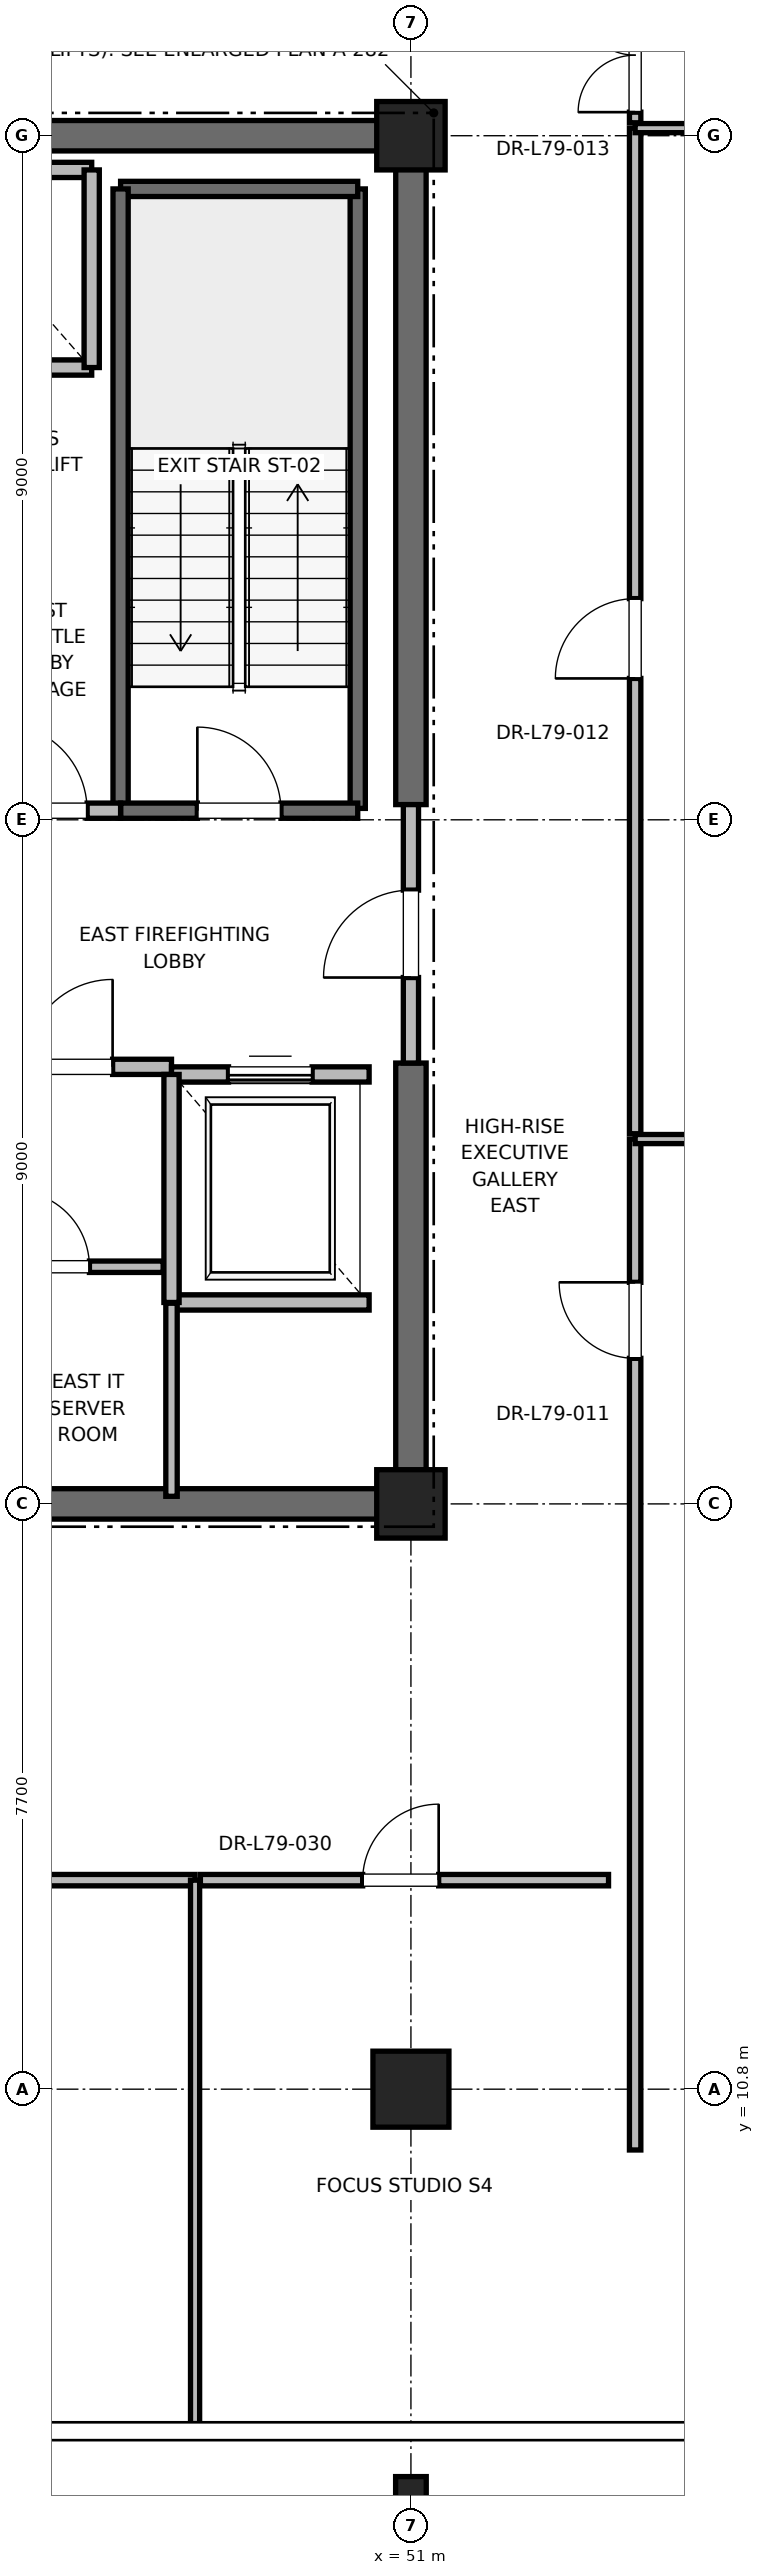
"""IFC4 building model, lengths in metres.
Left out: names, types, materials, properties, quantities, classifications, styles, units other than length and angle.
Written with IfcOpenShell. Run it as: python <this file> out.ifc"""

import sys

from ifc_helpers import new_model, si_unit, direction, frame, frame_2d, origin, origin_2d, place, context, subcontext, project, spatial, rectangle, i_section, extrude, element, fill, save


model = new_model("IFC4")
c1 = context("Model", 3, precision=1e-05, world=origin(), true_north=direction((0.0, 1.0)))
c2 = subcontext(c1, "Body", "Model", "MODEL_VIEW")
j1 = project(units=[si_unit("LENGTHUNIT", "METRE"), si_unit("PLANEANGLEUNIT", "RADIAN")], contexts=[c1])
p1 = place(None, origin())
s1 = spatial("IfcSite", under=j1, at=p1, CompositionType="ELEMENT")
p2 = place(p1, origin())
s2 = spatial("IfcBuilding", under=s1, at=p2, CompositionType="ELEMENT")
p3 = place(p2, frame((0.0, 0.0, 338.8)))
s3 = spatial("IfcBuildingStorey", under=s2, at=p3, CompositionType="ELEMENT", Elevation=338.8)
p4 = place(p3, frame((51.0, 10.8, 0.0), z_axis=(0.0, 0.0, 1.0), x_axis=(1.0, 0.0, 0.0)))
e1 = element("IfcColumn", 1, at=p4, inside=s3, PredefinedType="COLUMN", context=c2, shape_type="SweptSolid", body=[
    extrude(rectangle(XDim=1.0, YDim=1.0, at=origin_2d()), origin(), (0.0, 0.0, 1.0), 4.0),
])
p5 = place(p3, frame((51.0, 5.5, 0.0), z_axis=(0.0, 0.0, 1.0), x_axis=(1.0, 0.0, 0.0)))
e2 = element("IfcColumn", 2, at=p5, inside=s3, PredefinedType="COLUMN", context=c2, shape_type="SweptSolid", body=[
    extrude(i_section(OverallWidth=0.403, OverallDepth=0.406, WebThickness=0.027, FlangeThickness=0.043, FilletRadius=0.015, at=origin_2d()), origin(), (0.0, 0.0, 1.0), 4.0),
])
for number, where, z_axis, x_axis in (
    (3, (51.0, 18.5, 0.0), (0.0, 0.0, 1.0), (1.0, 0.0, 0.0)),
    (4, (51.0, 36.5, 0.0), (0.0, 0.0, 1.0), (1.0, 0.0, 0.0)),
):
    element("IfcColumn", number, at=place(p3, frame(where, z_axis=z_axis, x_axis=x_axis)), inside=s3, PredefinedType="PILASTER", context=c2, shape_type="SweptSolid", body=[
        extrude(rectangle(XDim=0.9, YDim=0.9, at=origin_2d()), origin(), (0.0, 0.0, 1.0), 4.0),
    ])
p6 = place(p3, frame((41.8, 18.5, 0.0), z_axis=(0.0, 0.0, 1.0), x_axis=(1.0, 0.0, 0.0)))
e5 = element("IfcWall", 5, at=p6, inside=s3, PredefinedType="SHEAR", context=c2, shape_type="SweptSolid", body=[
    extrude(rectangle(XDim=9.2, YDim=0.4, at=frame_2d((4.6, 0.0))), origin(), (0.0, 0.0, 1.0), 3.7),
])
for number, where, z_axis, x_axis in (
    (6, (45.2, 36.5, 0.0), (0.0, 0.0, 1.0), (1.0, 0.0, 0.0)),
    (7, (51.0, 18.5, 0.0), (0.0, 0.0, 1.0), (0.0, 1.0, 0.0)),
):
    element("IfcWall", number, at=place(p3, frame(where, z_axis=z_axis, x_axis=x_axis)), inside=s3, PredefinedType="SHEAR", context=c2, shape_type="SweptSolid", body=[
        extrude(rectangle(XDim=5.8, YDim=0.4, at=frame_2d((2.9, 0.0))), origin(), (0.0, 0.0, 1.0), 3.7),
    ])
p7 = place(p3, frame((51.0, 27.7, 0.0), z_axis=(0.0, 0.0, 1.0), x_axis=(0.0, 1.0, 0.0)))
e8 = element("IfcWall", 8, at=p7, inside=s3, PredefinedType="SHEAR", context=c2, shape_type="SweptSolid", body=[
    extrude(rectangle(XDim=8.8, YDim=0.4, at=frame_2d((4.4, 0.0))), origin(), (0.0, 0.0, 1.0), 3.7),
])
p8 = place(p3, frame((50.3, 27.65, 0.0), z_axis=(0.0, 0.0, 1.0), x_axis=(0.0, 1.0, 0.0)))
e9 = element("IfcWall", 9, at=p8, inside=s3, PredefinedType="SOLIDWALL", context=c2, shape_type="SweptSolid", body=[
    extrude(rectangle(XDim=8.15, YDim=0.2, at=frame_2d((4.075, 0.0))), origin(), (0.0, 0.0, 1.0), 3.7),
])
p9 = place(p3, frame((47.18, 35.8, 0.0), z_axis=(0.0, 0.0, 1.0), x_axis=(1.0, 0.0, 0.0)))
e10 = element("IfcWall", 10, at=p9, inside=s3, PredefinedType="SOLIDWALL", context=c2, shape_type="SweptSolid", body=[
    extrude(rectangle(XDim=3.12, YDim=0.2, at=frame_2d((1.56, 0.0))), origin(), (0.0, 0.0, 1.0), 3.7),
])
p10 = place(p3, frame((47.18, 27.62, 0.0), z_axis=(0.0, 0.0, 1.0), x_axis=(0.0, 1.0, 0.0)))
e11 = element("IfcWall", 11, at=p10, inside=s3, PredefinedType="SOLIDWALL", context=c2, shape_type="SweptSolid", body=[
    extrude(rectangle(XDim=8.18, YDim=0.2, at=frame_2d((4.09, 0.0))), origin(), (0.0, 0.0, 1.0), 3.7),
])
p11 = place(p3, frame((47.18, 27.62, 0.0), z_axis=(0.0, 0.0, 1.0), x_axis=(1.0, 0.0, 0.0)))
e12 = element("IfcWall", 12, at=p11, inside=s3, PredefinedType="SOLIDWALL", context=c2, shape_type="SweptSolid", body=[
    extrude(rectangle(XDim=3.12, YDim=0.2, at=frame_2d((1.56, 0.0))), origin(), (0.0, 0.0, 1.0), 3.7),
])
p12 = place(p11, frame((1.01, 0.0, 0.0)))
e13 = element("IfcOpeningElement", 13, at=p12, cuts=e12, PredefinedType="OPENING", context=c2, shape_type="SweptSolid", body=[
    extrude(rectangle(XDim=1.1, YDim=2.15, at=frame_2d((0.55, 1.075))), frame((0.0, 0.1, 0.0), z_axis=(0.0, -1.0, 0.0), x_axis=(1.0, 0.0, 0.0)), (0.0, 0.0, 1.0), 0.2),
])
p13 = place(p3, frame((45.15, 24.25, 0.0), z_axis=(0.0, 0.0, 1.0), x_axis=(1.0, 0.0, 0.0)))
e14 = element("IfcWall", 14, at=p13, inside=s3, PredefinedType="PARTITIONING", context=c2, shape_type="SweptSolid", body=[
    extrude(rectangle(XDim=2.7, YDim=0.2, at=frame_2d((1.35, 0.0))), origin(), (0.0, 0.0, 1.0), 3.7),
])
p14 = place(p13, frame((0.775, 0.0, 0.0)))
e15 = element("IfcOpeningElement", 15, at=p14, cuts=e14, PredefinedType="OPENING", context=c2, shape_type="SweptSolid", body=[
    extrude(rectangle(XDim=1.15, YDim=2.2, at=frame_2d((0.575, 1.1))), frame((0.0, 0.1, 0.0), z_axis=(0.0, -1.0, 0.0), x_axis=(1.0, 0.0, 0.0)), (0.0, 0.0, 1.0), 0.2),
])
p15 = place(p3, frame((45.15, 27.62, 0.0), z_axis=(0.0, 0.0, 1.0), x_axis=(1.0, 0.0, 0.0)))
e16 = element("IfcWall", 16, at=p15, inside=s3, PredefinedType="PARTITIONING", context=c2, shape_type="SweptSolid", body=[
    extrude(rectangle(XDim=2.03, YDim=0.2, at=frame_2d((1.015, 0.0))), origin(), (0.0, 0.0, 1.0), 3.7),
])
p16 = place(p15, frame((0.44, 0.0, 0.0)))
e17 = element("IfcOpeningElement", 17, at=p16, cuts=e16, PredefinedType="OPENING", context=c2, shape_type="SweptSolid", body=[
    extrude(rectangle(XDim=1.15, YDim=2.2, at=frame_2d((0.575, 1.1))), frame((0.0, 0.1, 0.0), z_axis=(0.0, -1.0, 0.0), x_axis=(1.0, 0.0, 0.0)), (0.0, 0.0, 1.0), 0.2),
])
p17 = place(p3, frame((51.0, 24.3, 0.0), z_axis=(0.0, 0.0, 1.0), x_axis=(0.0, 1.0, 0.0)))
e18 = element("IfcWall", 18, at=p17, inside=s3, PredefinedType="PARTITIONING", context=c2, shape_type="SweptSolid", body=[
    extrude(rectangle(XDim=3.4, YDim=0.2, at=frame_2d((1.7, 0.0))), origin(), (0.0, 0.0, 1.0), 2.78),
])
p18 = place(p17, frame((1.125, 0.0, 0.0)))
e19 = element("IfcOpeningElement", 19, at=p18, cuts=e18, PredefinedType="OPENING", context=c2, shape_type="SweptSolid", body=[
    extrude(rectangle(XDim=1.15, YDim=2.2, at=frame_2d((0.575, 1.1))), frame((0.0, 0.1, 0.0), z_axis=(0.0, -1.0, 0.0), x_axis=(1.0, 0.0, 0.0)), (0.0, 0.0, 1.0), 0.2),
])
p19 = place(p3, frame((47.85, 21.15, 0.0), z_axis=(0.0, 0.0, 1.0), x_axis=(1.0, 0.0, 0.0)))
e20 = element("IfcWall", 20, at=p19, inside=s3, PredefinedType="SOLIDWALL", context=c2, shape_type="SweptSolid", body=[
    extrude(rectangle(XDim=2.6, YDim=0.2, at=frame_2d((1.3, 0.0))), origin(), (0.0, 0.0, 1.0), 3.7),
])
p20 = place(p3, frame((50.45, 24.15, 0.0), z_axis=(0.0, 0.0, 1.0), x_axis=(-1.0, 0.0, 0.0)))
e21 = element("IfcWall", 21, at=p20, inside=s3, PredefinedType="SOLIDWALL", context=c2, shape_type="SweptSolid", body=[
    extrude(rectangle(XDim=2.6, YDim=0.2, at=frame_2d((1.3, 0.0))), origin(), (0.0, 0.0, 1.0), 2.78),
])
p21 = place(p20, frame((0.75, 0.0, 0.0)))
e22 = element("IfcOpeningElement", 22, at=p21, cuts=e21, PredefinedType="OPENING", context=c2, shape_type="SweptSolid", body=[
    extrude(rectangle(XDim=1.1, YDim=2.2, at=frame_2d((0.55, 1.1))), frame((0.0, 0.1, 0.0), z_axis=(0.0, -1.0, 0.0), x_axis=(1.0, 0.0, 0.0)), (0.0, 0.0, 1.0), 0.2),
])
p22 = place(p3, frame((47.85, 24.15, 0.0), z_axis=(0.0, 0.0, 1.0), x_axis=(0.0, -1.0, 0.0)))
e23 = element("IfcWall", 23, at=p22, inside=s3, PredefinedType="SOLIDWALL", context=c2, shape_type="SweptSolid", body=[
    extrude(rectangle(XDim=3.0, YDim=0.2, at=frame_2d((1.5, 0.0))), origin(), (0.0, 0.0, 1.0), 3.7),
])
p23 = place(p3, frame((44.5, 33.45, 0.0), z_axis=(0.0, 0.0, 1.0), x_axis=(1.0, 0.0, 0.0)))
e24 = element("IfcWall", 24, at=p23, inside=s3, PredefinedType="SOLIDWALL", context=c2, shape_type="SweptSolid", body=[
    extrude(rectangle(XDim=2.3, YDim=0.2, at=frame_2d((1.15, 0.0))), origin(), (0.0, 0.0, 1.0), 3.7),
])
p24 = place(p3, frame((46.8, 36.05, 0.0), z_axis=(0.0, 0.0, 1.0), x_axis=(-1.0, 0.0, 0.0)))
e25 = element("IfcWall", 25, at=p24, inside=s3, PredefinedType="SOLIDWALL", context=c2, shape_type="SweptSolid", body=[
    extrude(rectangle(XDim=2.3, YDim=0.2, at=frame_2d((1.15, 0.0))), origin(), (0.0, 0.0, 1.0), 2.78),
])
p25 = place(p3, frame((46.8, 33.45, 0.0), z_axis=(0.0, 0.0, 1.0), x_axis=(0.0, 1.0, 0.0)))
e26 = element("IfcWall", 26, at=p25, inside=s3, PredefinedType="SOLIDWALL", context=c2, shape_type="SweptSolid", body=[
    extrude(rectangle(XDim=2.6, YDim=0.2, at=frame_2d((1.3, 0.0))), origin(), (0.0, 0.0, 1.0), 3.7),
])
p26 = place(p3, frame((47.85, 18.6, 0.0), z_axis=(0.0, 0.0, 1.0), x_axis=(0.0, 1.0, 0.0)))
e27 = element("IfcWall", 27, at=p26, inside=s3, PredefinedType="PARTITIONING", context=c2, shape_type="SweptSolid", body=[
    extrude(rectangle(XDim=2.54, YDim=0.15, at=frame_2d((1.27, 0.0))), origin(), (0.0, 0.0, 1.0), 2.85),
])
p27 = place(p3, frame((44.8, 21.62, 0.0), z_axis=(0.0, 0.0, 1.0), x_axis=(1.0, 0.0, 0.0)))
e28 = element("IfcWall", 28, at=p27, inside=s3, PredefinedType="PARTITIONING", context=c2, shape_type="SweptSolid", body=[
    extrude(rectangle(XDim=2.94, YDim=0.15, at=frame_2d((1.47, 0.0))), origin(), (0.0, 0.0, 1.0), 2.85),
])
p28 = place(p27, frame((0.97, 0.0, 0.0)))
e29 = element("IfcOpeningElement", 29, at=p28, cuts=e28, PredefinedType="OPENING", context=c2, shape_type="SweptSolid", body=[
    extrude(rectangle(XDim=1.0, YDim=2.15, at=frame_2d((0.5, 1.075))), frame((0.0, 0.075, 0.0), z_axis=(0.0, -1.0, 0.0), x_axis=(1.0, 0.0, 0.0)), (0.0, 0.0, 1.0), 0.15),
])
p29 = place(p3, frame((39.798, 13.55, 0.0), z_axis=(0.0, 0.0, 1.0), x_axis=(1.0, 0.0, 0.0)))
e30 = element("IfcWall", 30, at=p29, inside=s3, PredefinedType="PARTITIONING", context=c2, shape_type="SweptSolid", body=[
    extrude(rectangle(XDim=8.362, YDim=0.15, at=frame_2d((4.181, 0.0))), origin(), (0.0, 0.0, 1.0), 2.85),
])
p30 = place(p29, frame((3.646, 0.0, 0.0)))
e31 = element("IfcOpeningElement", 31, at=p30, cuts=e30, PredefinedType="OPENING", context=c2, shape_type="SweptSolid", body=[
    extrude(rectangle(XDim=1.0, YDim=2.15, at=frame_2d((0.5, 1.075))), frame((0.0, 0.075, 0.0), z_axis=(0.0, -1.0, 0.0), x_axis=(1.0, 0.0, 0.0)), (0.0, 0.0, 1.0), 0.15),
])
p31 = place(p3, frame((48.16, 6.4, 0.0), z_axis=(0.0, 0.0, 1.0), x_axis=(0.0, 1.0, 0.0)))
e32 = element("IfcWall", 32, at=p31, inside=s3, PredefinedType="PARTITIONING", context=c2, shape_type="SweptSolid", body=[
    extrude(rectangle(XDim=7.15, YDim=0.12, at=frame_2d((3.575, 0.0))), origin(), (0.0, 0.0, 1.0), 2.33),
])
p32 = place(p3, frame((48.23, 13.55, 0.0), z_axis=(0.0, 0.0, 1.0), x_axis=(1.0, 0.0, 0.0)))
e33 = element("IfcWall", 33, at=p32, inside=s3, PredefinedType="PARTITIONING", context=c2, shape_type="SweptSolid", body=[
    extrude(rectangle(XDim=5.37, YDim=0.15, at=frame_2d((2.685, 0.0))), origin(), (0.0, 0.0, 1.0), 2.753),
])
p33 = place(p32, frame((2.135, 0.0, 0.0)))
e34 = element("IfcOpeningElement", 34, at=p33, cuts=e33, PredefinedType="OPENING", context=c2, shape_type="SweptSolid", body=[
    extrude(rectangle(XDim=1.0, YDim=2.15, at=frame_2d((0.5, 1.075))), frame((0.0, 0.075, 0.0), z_axis=(0.0, -1.0, 0.0), x_axis=(1.0, 0.0, 0.0)), (0.0, 0.0, 1.0), 0.15),
])
p34 = place(p3, frame((53.95, 10.0, 0.0), z_axis=(0.0, 0.0, 1.0), x_axis=(0.0, 1.0, 0.0)))
e35 = element("IfcWall", 35, at=p34, inside=s3, PredefinedType="PARTITIONING", context=c2, shape_type="SweptSolid", body=[
    extrude(rectangle(XDim=13.3, YDim=0.15, at=frame_2d((6.65, 0.0))), origin(), (0.0, 0.0, 1.0), 2.753),
])
p35 = place(p34, frame((10.415, 0.0, 0.0)))
e36 = element("IfcOpeningElement", 36, at=p35, cuts=e35, PredefinedType="OPENING", context=c2, shape_type="SweptSolid", body=[
    extrude(rectangle(XDim=1.0, YDim=2.15, at=frame_2d((0.5, 1.075))), frame((0.0, 0.075, 0.0), z_axis=(0.0, -1.0, 0.0), x_axis=(1.0, 0.0, 0.0)), (0.0, 0.0, 1.0), 0.15),
])
p36 = place(p3, frame((53.95, 23.3, 0.0), z_axis=(0.0, 0.0, 1.0), x_axis=(1.0, 0.0, 0.0)))
e37 = element("IfcWall", 37, at=p36, inside=s3, PredefinedType="PARTITIONING", context=c2, shape_type="SweptSolid", body=[
    extrude(rectangle(XDim=9.95, YDim=0.12, at=frame_2d((4.975, 0.0))), origin(), (0.0, 0.0, 1.0), 2.753),
])
p37 = place(p3, frame((53.95, 23.37, 0.0), z_axis=(0.0, 0.0, 1.0), x_axis=(0.0, 1.0, 0.0)))
e38 = element("IfcWall", 38, at=p37, inside=s3, PredefinedType="PARTITIONING", context=c2, shape_type="SweptSolid", body=[
    extrude(rectangle(XDim=13.23, YDim=0.15, at=frame_2d((6.615, 0.0))), origin(), (0.0, 0.0, 1.0), 2.753),
])
p38 = place(p37, frame((5.99, 0.0, 0.0)))
e39 = element("IfcOpeningElement", 39, at=p38, cuts=e38, PredefinedType="OPENING", context=c2, shape_type="SweptSolid", body=[
    extrude(rectangle(XDim=1.05, YDim=2.2, at=frame_2d((0.525, 1.1))), frame((0.0, 0.075, 0.0), z_axis=(0.0, -1.0, 0.0), x_axis=(1.0, 0.0, 0.0)), (0.0, 0.0, 1.0), 0.15),
])
p39 = place(p3, frame((53.95, 36.6, 0.0), z_axis=(0.0, 0.0, 1.0), x_axis=(1.0, 0.0, 0.0)))
e40 = element("IfcWall", 40, at=p39, inside=s3, PredefinedType="PARTITIONING", context=c2, shape_type="SweptSolid", body=[
    extrude(rectangle(XDim=9.95, YDim=0.12, at=frame_2d((4.975, 0.0))), origin(), (0.0, 0.0, 1.0), 2.753),
])
p40 = place(p3, frame((53.95, 36.67, 0.0), z_axis=(0.0, 0.0, 1.0), x_axis=(0.0, 1.0, 0.0)))
e41 = element("IfcWall", 41, at=p40, inside=s3, PredefinedType="PARTITIONING", context=c2, shape_type="SweptSolid", body=[
    extrude(rectangle(XDim=8.33, YDim=0.15, at=frame_2d((4.165, 0.0))), origin(), (0.0, 0.0, 1.0), 2.753),
])
p41 = place(p40, frame((0.14, 0.0, 0.0)))
e42 = element("IfcOpeningElement", 42, at=p41, cuts=e41, PredefinedType="OPENING", context=c2, shape_type="SweptSolid", body=[
    extrude(rectangle(XDim=1.5, YDim=2.25, at=frame_2d((0.75, 1.125))), frame((0.0, 0.075, 0.0), z_axis=(0.0, -1.0, 0.0), x_axis=(1.0, 0.0, 0.0)), (0.0, 0.0, 1.0), 0.15),
])
p42 = place(p12, origin())
e43 = element("IfcDoor", 43, at=p42, inside=s3, OperationType="SINGLE_SWING_LEFT", PredefinedType="DOOR", context=c2, shape_type="SweptSolid", body=[
    extrude(rectangle(XDim=1.1, YDim=2.15, at=frame_2d((0.55, 1.075))), frame((0.0, 0.025, 0.0), z_axis=(0.0, -1.0, 0.0), x_axis=(1.0, 0.0, 0.0)), (0.0, 0.0, 1.0), 0.05),
])
fill(e13, e43)
p43 = place(p14, origin())
e44 = element("IfcDoor", 44, at=p43, inside=s3, OperationType="SINGLE_SWING_RIGHT", PredefinedType="DOOR", context=c2, shape_type="SweptSolid", body=[
    extrude(rectangle(XDim=1.15, YDim=2.2, at=frame_2d((0.575, 1.1))), frame((0.0, 0.025, 0.0), z_axis=(0.0, -1.0, 0.0), x_axis=(1.0, 0.0, 0.0)), (0.0, 0.0, 1.0), 0.05),
])
fill(e15, e44)
p44 = place(p16, origin())
e45 = element("IfcDoor", 45, at=p44, inside=s3, OperationType="SINGLE_SWING_LEFT", PredefinedType="DOOR", context=c2, shape_type="SweptSolid", body=[
    extrude(rectangle(XDim=1.15, YDim=2.2, at=frame_2d((0.575, 1.1))), frame((0.0, 0.025, 0.0), z_axis=(0.0, -1.0, 0.0), x_axis=(1.0, 0.0, 0.0)), (0.0, 0.0, 1.0), 0.05),
])
fill(e17, e45)
p45 = place(p18, origin())
e46 = element("IfcDoor", 46, at=p45, inside=s3, OperationType="SINGLE_SWING_LEFT", PredefinedType="DOOR", context=c2, shape_type="SweptSolid", body=[
    extrude(rectangle(XDim=1.15, YDim=2.2, at=frame_2d((0.575, 1.1))), frame((0.0, 0.025, 0.0), z_axis=(0.0, -1.0, 0.0), x_axis=(1.0, 0.0, 0.0)), (0.0, 0.0, 1.0), 0.05),
])
fill(e19, e46)
p46 = place(p21, origin())
e47 = element("IfcDoor", 47, at=p46, inside=s3, OperationType="SLIDING_TO_RIGHT", PredefinedType="DOOR", context=c2, shape_type="SweptSolid", body=[
    extrude(rectangle(XDim=1.1, YDim=2.2, at=frame_2d((0.55, 1.1))), frame((0.0, 0.025, 0.0), z_axis=(0.0, -1.0, 0.0), x_axis=(1.0, 0.0, 0.0)), (0.0, 0.0, 1.0), 0.05),
])
fill(e22, e47)
p47 = place(p28, origin())
e48 = element("IfcDoor", 48, at=p47, inside=s3, OperationType="SINGLE_SWING_LEFT", PredefinedType="DOOR", context=c2, shape_type="SweptSolid", body=[
    extrude(rectangle(XDim=1.0, YDim=2.15, at=frame_2d((0.5, 1.075))), frame((0.0, 0.025, 0.0), z_axis=(0.0, -1.0, 0.0), x_axis=(1.0, 0.0, 0.0)), (0.0, 0.0, 1.0), 0.05),
])
fill(e29, e48)
p48 = place(p33, origin())
e49 = element("IfcDoor", 49, at=p48, inside=s3, OperationType="SINGLE_SWING_RIGHT", PredefinedType="DOOR", context=c2, shape_type="SweptSolid", body=[
    extrude(rectangle(XDim=1.0, YDim=2.15, at=frame_2d((0.5, 1.075))), frame((0.0, 0.025, 0.0), z_axis=(0.0, -1.0, 0.0), x_axis=(1.0, 0.0, 0.0)), (0.0, 0.0, 1.0), 0.05),
])
fill(e34, e49)
p49 = place(p35, origin())
e50 = element("IfcDoor", 50, at=p49, inside=s3, OperationType="SINGLE_SWING_RIGHT", PredefinedType="DOOR", context=c2, shape_type="SweptSolid", body=[
    extrude(rectangle(XDim=1.0, YDim=2.15, at=frame_2d((0.5, 1.075))), frame((0.0, 0.025, 0.0), z_axis=(0.0, -1.0, 0.0), x_axis=(1.0, 0.0, 0.0)), (0.0, 0.0, 1.0), 0.05),
])
fill(e36, e50)
p50 = place(p38, origin())
e51 = element("IfcDoor", 51, at=p50, inside=s3, OperationType="SINGLE_SWING_LEFT", PredefinedType="DOOR", context=c2, shape_type="SweptSolid", body=[
    extrude(rectangle(XDim=1.05, YDim=2.2, at=frame_2d((0.525, 1.1))), frame((0.0, 0.025, 0.0), z_axis=(0.0, -1.0, 0.0), x_axis=(1.0, 0.0, 0.0)), (0.0, 0.0, 1.0), 0.05),
])
fill(e39, e51)
p51 = place(p41, origin())
e52 = element("IfcDoor", 52, at=p51, inside=s3, OperationType="DOUBLE_DOOR_SINGLE_SWING", PredefinedType="DOOR", context=c2, shape_type="SweptSolid", body=[
    extrude(rectangle(XDim=1.5, YDim=2.25, at=frame_2d((0.75, 1.125))), frame((0.0, 0.025, 0.0), z_axis=(0.0, -1.0, 0.0), x_axis=(1.0, 0.0, 0.0)), (0.0, 0.0, 1.0), 0.05),
])
fill(e42, e52)
save(model, sys.argv[1])
